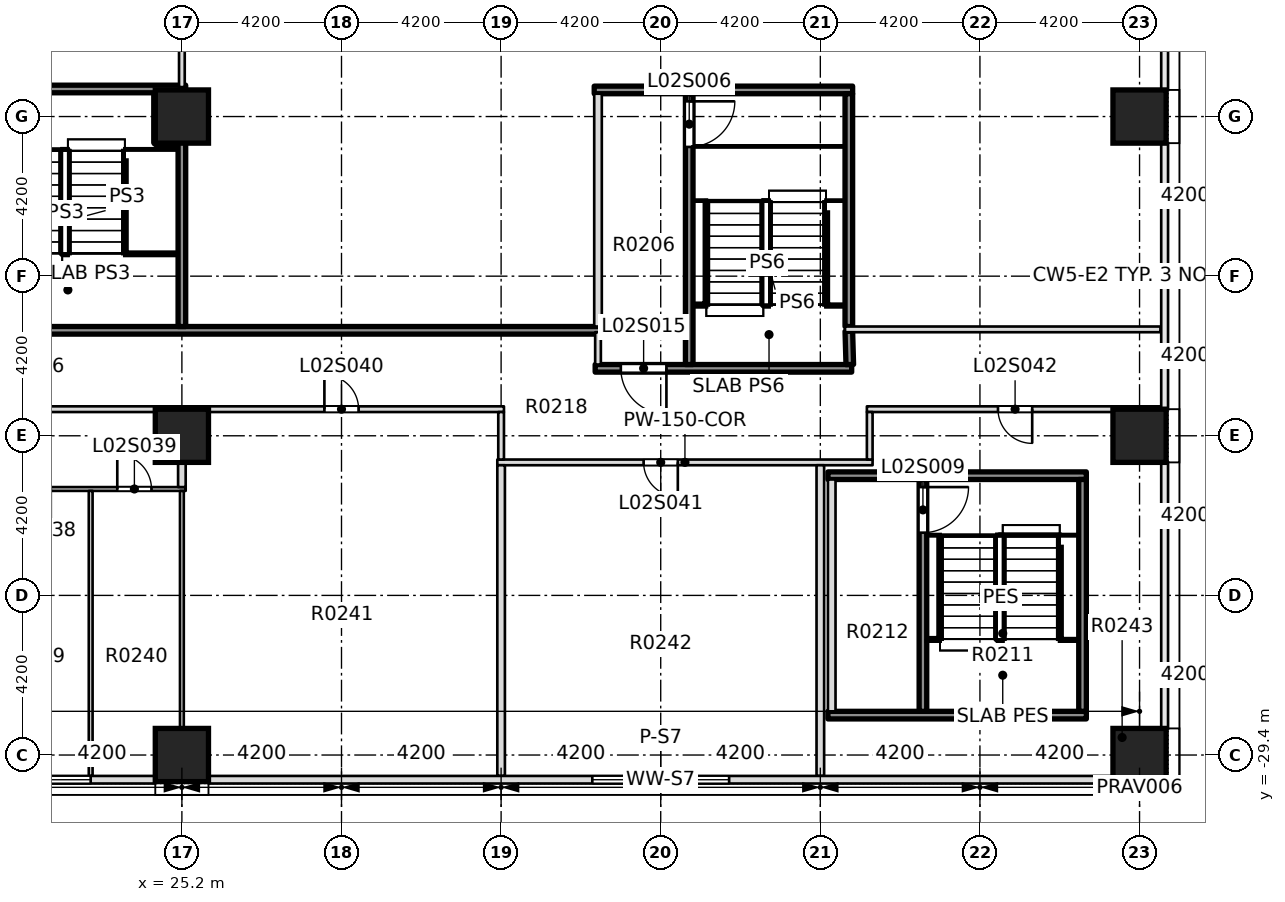
"""IFC4 building model, lengths in metres.
Left out: names, types, materials, properties, quantities, classifications, styles, units other than length and angle.
Written with IfcOpenShell. Run it as: python <this file> out.ifc"""

import sys

from ifc_helpers import new_model, si_unit, direction, frame, frame_2d, origin, origin_2d, place, context, subcontext, project, spatial, rectangle, extrude, element, fill, save


model = new_model("IFC4")
c1 = context("Model", 3, precision=1e-05, world=origin(), true_north=direction((0.0, 1.0)))
c2 = subcontext(c1, "Body", "Model", "MODEL_VIEW")
j1 = project(units=[si_unit("LENGTHUNIT", "METRE"), si_unit("PLANEANGLEUNIT", "RADIAN")], contexts=[c1])
p1 = place(None, origin())
s1 = spatial("IfcSite", under=j1, at=p1, CompositionType="ELEMENT")
p2 = place(p1, origin())
s2 = spatial("IfcBuilding", under=s1, at=p2, CompositionType="ELEMENT")
p3 = place(p2, frame((0.0, 0.0, 12.5)))
s3 = spatial("IfcBuildingStorey", under=s2, at=p3, CompositionType="ELEMENT", Elevation=12.5)
for number, where, z_axis, x_axis in (
    (1, (25.2, -12.6, -0.4), (0.0, 0.0, 1.0), (1.0, 0.0, 0.0)),
    (2, (25.2, -29.4, 0.0), (0.0, 0.0, 1.0), (1.0, 0.0, 0.0)),
    (3, (50.4, -29.4, 0.0), (0.0, 0.0, 1.0), (1.0, 0.0, 0.0)),
    (4, (25.2, -21.0, 0.0), (0.0, 0.0, 1.0), (1.0, 0.0, 0.0)),
    (5, (50.4, -21.0, 0.0), (0.0, 0.0, 1.0), (1.0, 0.0, 0.0)),
    (6, (50.4, -12.6, 0.0), (0.0, 0.0, 1.0), (1.0, 0.0, 0.0)),
):
    element("IfcColumn", number, at=place(p3, frame(where, z_axis=z_axis, x_axis=x_axis)), inside=s3, PredefinedType="COLUMN", context=c2, shape_type="SweptSolid", body=[
        extrude(rectangle(XDim=1.4, YDim=1.4, at=origin_2d()), origin(), (0.0, 0.0, 1.0), 7.5),
    ])
p4 = place(p3, frame((42.2, -28.35, 0.0), z_axis=(0.0, 0.0, 1.0), x_axis=(1.0, 0.0, 0.0)))
e7 = element("IfcWall", 7, at=p4, inside=s3, PredefinedType="SOLIDWALL", context=c2, shape_type="SweptSolid", body=[
    extrude(rectangle(XDim=6.8, YDim=0.2, at=frame_2d((3.4, 0.0))), origin(), (0.0, 0.0, 1.0), 7.1),
])
p5 = place(p3, frame((16.7, -22.4, 0.0), z_axis=(0.0, 0.0, 1.0), x_axis=(1.0, 0.0, 0.0)))
e8 = element("IfcWall", 8, at=p5, inside=s3, PredefinedType="PARTITIONING", context=c2, shape_type="SweptSolid", body=[
    extrude(rectangle(XDim=8.6, YDim=0.1, at=frame_2d((4.3, 0.0))), origin(), (0.0, 0.0, 1.0), 7.1),
])
p6 = place(p5, frame((1.15, 0.0, 0.0)))
e9 = element("IfcOpeningElement", 9, at=p6, cuts=e8, PredefinedType="OPENING", context=c2, shape_type="SweptSolid", body=[
    extrude(rectangle(XDim=0.9, YDim=2.1, at=frame_2d((0.45, 1.05))), frame((0.0, 0.06, 0.0), z_axis=(0.0, -1.0, 0.0), x_axis=(1.0, 0.0, 0.0)), (0.0, 0.0, 1.0), 0.12),
])
p7 = place(p5, frame((4.15, 0.0, 0.0)))
e10 = element("IfcOpeningElement", 10, at=p7, cuts=e8, PredefinedType="OPENING", context=c2, shape_type="SweptSolid", body=[
    extrude(rectangle(XDim=0.9, YDim=2.1, at=frame_2d((0.45, 1.05))), frame((0.0, 0.06, 0.0), z_axis=(0.0, -1.0, 0.0), x_axis=(1.0, 0.0, 0.0)), (0.0, 0.0, 1.0), 0.12),
])
p8 = place(p5, frame((6.8, 0.0, 0.0)))
e11 = element("IfcOpeningElement", 11, at=p8, cuts=e8, PredefinedType="OPENING", context=c2, shape_type="SweptSolid", body=[
    extrude(rectangle(XDim=0.9, YDim=2.1, at=frame_2d((0.45, 1.05))), frame((0.0, 0.06, 0.0), z_axis=(0.0, -1.0, 0.0), x_axis=(1.0, 0.0, 0.0)), (0.0, 0.0, 1.0), 0.12),
])
p9 = place(p3, frame((42.2, -22.05, 0.0), z_axis=(0.0, 0.0, 1.0), x_axis=(1.0, 0.0, 0.0)))
e12 = element("IfcWall", 12, at=p9, inside=s3, PredefinedType="SOLIDWALL", context=c2, shape_type="SweptSolid", body=[
    extrude(rectangle(XDim=6.8, YDim=0.2, at=frame_2d((3.4, 0.0))), origin(), (0.0, 0.0, 1.0), 7.1),
])
p10 = place(p3, frame((33.5, -21.7, 0.0), z_axis=(0.0, 0.0, 1.0), x_axis=(1.0, 0.0, 0.0)))
e13 = element("IfcWall", 13, at=p10, inside=s3, PredefinedType="PARTITIONING", context=c2, shape_type="SweptSolid", body=[
    extrude(rectangle(XDim=9.875, YDim=0.15, at=frame_2d((4.938, 0.0))), origin(), (0.0, 0.0, 1.0), 7.1),
])
p11 = place(p10, frame((3.85, 0.0, 0.0)))
e14 = element("IfcOpeningElement", 14, at=p11, cuts=e13, PredefinedType="OPENING", context=c2, shape_type="SweptSolid", body=[
    extrude(rectangle(XDim=0.9, YDim=2.1, at=frame_2d((0.45, 1.05))), frame((0.0, 0.085, 0.0), z_axis=(0.0, -1.0, 0.0), x_axis=(1.0, 0.0, 0.0)), (0.0, 0.0, 1.0), 0.17),
])
p12 = place(p3, frame((-25.2, -20.3, 0.0), z_axis=(0.0, 0.0, 1.0), x_axis=(1.0, 0.0, 0.0)))
e15 = element("IfcWall", 15, at=p12, inside=s3, PredefinedType="PARTITIONING", context=c2, shape_type="SweptSolid", body=[
    extrude(rectangle(XDim=58.875, YDim=0.15, at=frame_2d((29.438, 0.0))), origin(), (0.0, 0.0, 1.0), 7.1),
])
p13 = place(p12, frame((3.65, 0.0, 0.0)))
e16 = element("IfcOpeningElement", 16, at=p13, cuts=e15, PredefinedType="OPENING", context=c2, shape_type="SweptSolid", body=[
    extrude(rectangle(XDim=1.1, YDim=2.1, at=frame_2d((0.55, 1.05))), frame((0.0, 0.085, 0.0), z_axis=(0.0, -1.0, 0.0), x_axis=(1.0, 0.0, 0.0)), (0.0, 0.0, 1.0), 0.17),
])
p14 = place(p12, frame((11.5, 0.0, 0.0)))
e17 = element("IfcOpeningElement", 17, at=p14, cuts=e15, PredefinedType="OPENING", context=c2, shape_type="SweptSolid", body=[
    extrude(rectangle(XDim=1.2, YDim=2.1, at=frame_2d((0.6, 1.05))), frame((0.0, 0.085, 0.0), z_axis=(0.0, -1.0, 0.0), x_axis=(1.0, 0.0, 0.0)), (0.0, 0.0, 1.0), 0.17),
])
p15 = place(p12, frame((20.55, 0.0, 0.0)))
e18 = element("IfcOpeningElement", 18, at=p15, cuts=e15, PredefinedType="OPENING", context=c2, shape_type="SweptSolid", body=[
    extrude(rectangle(XDim=0.9, YDim=2.1, at=frame_2d((0.45, 1.05))), frame((0.0, 0.085, 0.0), z_axis=(0.0, -1.0, 0.0), x_axis=(1.0, 0.0, 0.0)), (0.0, 0.0, 1.0), 0.17),
])
p16 = place(p12, frame((31.95, 0.0, 0.0)))
e19 = element("IfcOpeningElement", 19, at=p16, cuts=e15, PredefinedType="OPENING", context=c2, shape_type="SweptSolid", body=[
    extrude(rectangle(XDim=0.9, YDim=2.1, at=frame_2d((0.45, 1.05))), frame((0.0, 0.085, 0.0), z_axis=(0.0, -1.0, 0.0), x_axis=(1.0, 0.0, 0.0)), (0.0, 0.0, 1.0), 0.17),
])
p17 = place(p12, frame((45.65, 0.0, 0.0)))
e20 = element("IfcOpeningElement", 20, at=p17, cuts=e15, PredefinedType="OPENING", context=c2, shape_type="SweptSolid", body=[
    extrude(rectangle(XDim=1.1, YDim=2.1, at=frame_2d((0.55, 1.05))), frame((0.0, 0.085, 0.0), z_axis=(0.0, -1.0, 0.0), x_axis=(1.0, 0.0, 0.0)), (0.0, 0.0, 1.0), 0.17),
])
p18 = place(p12, frame((54.15, 0.0, 0.0)))
e21 = element("IfcOpeningElement", 21, at=p18, cuts=e15, PredefinedType="OPENING", context=c2, shape_type="SweptSolid", body=[
    extrude(rectangle(XDim=0.9, YDim=2.1, at=frame_2d((0.45, 1.05))), frame((0.0, 0.085, 0.0), z_axis=(0.0, -1.0, 0.0), x_axis=(1.0, 0.0, 0.0)), (0.0, 0.0, 1.0), 0.17),
])
p19 = place(p3, frame((43.225, -20.3, 0.0), z_axis=(0.0, 0.0, 1.0), x_axis=(1.0, 0.0, 0.0)))
e22 = element("IfcWall", 22, at=p19, inside=s3, PredefinedType="PARTITIONING", context=c2, shape_type="SweptSolid", body=[
    extrude(rectangle(XDim=7.725, YDim=0.15, at=frame_2d((3.862, 0.0))), origin(), (0.0, 0.0, 1.0), 7.1),
])
p20 = place(p19, frame((3.45, 0.0, 0.0)))
e23 = element("IfcOpeningElement", 23, at=p20, cuts=e22, PredefinedType="OPENING", context=c2, shape_type="SweptSolid", body=[
    extrude(rectangle(XDim=0.9, YDim=2.1, at=frame_2d((0.45, 1.05))), frame((0.0, 0.085, 0.0), z_axis=(0.0, -1.0, 0.0), x_axis=(1.0, 0.0, 0.0)), (0.0, 0.0, 1.0), 0.17),
])
p21 = place(p3, frame((36.075, -19.225, 0.0), z_axis=(0.0, 0.0, 1.0), x_axis=(1.0, 0.0, 0.0)))
e24 = element("IfcWall", 24, at=p21, inside=s3, PredefinedType="SOLIDWALL", context=c2, shape_type="SweptSolid", body=[
    extrude(rectangle(XDim=6.75, YDim=0.2, at=frame_2d((3.375, 0.0))), origin(), (0.0, 0.0, 1.0), 7.1),
])
p22 = place(p21, frame((0.675, 0.0, 0.0)))
e25 = element("IfcOpeningElement", 25, at=p22, cuts=e24, PredefinedType="OPENING", context=c2, shape_type="SweptSolid", body=[
    extrude(rectangle(XDim=1.2, YDim=2.1, at=frame_2d((0.6, 1.05))), frame((0.0, 0.11, 0.0), z_axis=(0.0, -1.0, 0.0), x_axis=(1.0, 0.0, 0.0)), (0.0, 0.0, 1.0), 0.22),
])
p23 = place(p3, frame((12.25, -18.225, 0.0), z_axis=(0.0, 0.0, 1.0), x_axis=(1.0, 0.0, 0.0)))
e26 = element("IfcWall", 26, at=p23, inside=s3, PredefinedType="SOLIDWALL", context=c2, shape_type="SweptSolid", body=[
    extrude(rectangle(XDim=24.0, YDim=0.2, at=frame_2d((12.0, 0.0))), origin(), (0.0, 0.0, 1.0), 7.1),
])
p24 = place(p23, frame((5.15, 0.0, 0.0)))
e27 = element("IfcOpeningElement", 27, at=p24, cuts=e26, PredefinedType="OPENING", context=c2, shape_type="SweptSolid", body=[
    extrude(rectangle(XDim=1.2, YDim=2.1, at=frame_2d((0.6, 1.05))), frame((0.0, 0.11, 0.0), z_axis=(0.0, -1.0, 0.0), x_axis=(1.0, 0.0, 0.0)), (0.0, 0.0, 1.0), 0.22),
])
p25 = place(p23, frame((1.825, 0.0, 0.0)))
e28 = element("IfcOpeningElement", 28, at=p25, cuts=e26, PredefinedType="OPENING", context=c2, shape_type="SweptSolid", body=[
    extrude(rectangle(XDim=0.7, YDim=2.1, at=frame_2d((0.35, 1.05))), frame((0.0, 0.11, 0.0), z_axis=(0.0, -1.0, 0.0), x_axis=(1.0, 0.0, 0.0)), (0.0, 0.0, 1.0), 0.22),
])
p26 = place(p3, frame((42.65, -18.2, 0.0), z_axis=(0.0, 0.0, 1.0), x_axis=(1.0, 0.0, 0.0)))
e29 = element("IfcWall", 29, at=p26, inside=s3, PredefinedType="PARTITIONING", context=c2, shape_type="SweptSolid", body=[
    extrude(rectangle(XDim=8.3, YDim=0.15, at=frame_2d((4.15, 0.0))), origin(), (0.0, 0.0, 1.0), 7.1),
])
p27 = place(p3, frame((16.725, -11.875, 0.0), z_axis=(0.0, 0.0, 1.0), x_axis=(1.0, 0.0, 0.0)))
e30 = element("IfcWall", 30, at=p27, inside=s3, PredefinedType="SOLIDWALL", context=c2, shape_type="SweptSolid", body=[
    extrude(rectangle(XDim=8.575, YDim=0.2, at=frame_2d((4.288, 0.0))), origin(), (0.0, 0.0, 1.0), 7.1),
])
p28 = place(p3, frame((36.05, -11.9, 0.0), z_axis=(0.0, 0.0, 1.0), x_axis=(1.0, 0.0, 0.0)))
e31 = element("IfcWall", 31, at=p28, inside=s3, PredefinedType="SOLIDWALL", context=c2, shape_type="SweptSolid", body=[
    extrude(rectangle(XDim=6.8, YDim=0.2, at=frame_2d((3.4, 0.0))), origin(), (0.0, 0.0, 1.0), 7.1),
])
for number, where, z_axis, x_axis in (
    (32, (22.8, -29.95, 0.0), (0.0, 0.0, 1.0), (0.0, 1.0, 0.0)),
    (33, (25.2, -29.95, 0.0), (0.0, 0.0, 1.0), (0.0, 1.0, 0.0)),
):
    element("IfcWall", number, at=place(p3, frame(where, z_axis=z_axis, x_axis=x_axis)), inside=s3, PredefinedType="PARTITIONING", context=c2, shape_type="SweptSolid", body=[
        extrude(rectangle(XDim=7.5, YDim=0.1, at=frame_2d((3.75, 0.0))), origin(), (0.0, 0.0, 1.0), 7.1),
    ])
p29 = place(p3, frame((25.2, -22.35, 0.0), z_axis=(0.0, 0.0, 1.0), x_axis=(0.0, 1.0, 0.0)))
e34 = element("IfcWall", 34, at=p29, inside=s3, PredefinedType="PARTITIONING", context=c2, shape_type="SweptSolid", body=[
    extrude(rectangle(XDim=1.975, YDim=0.2, at=frame_2d((0.988, 0.0))), origin(), (0.0, 0.0, 1.0), 7.1),
])
p30 = place(p3, frame((25.2, -18.125, 0.0), z_axis=(0.0, 0.0, 1.0), x_axis=(0.0, 1.0, 0.0)))
e35 = element("IfcWall", 35, at=p30, inside=s3, PredefinedType="SOLIDWALL", context=c2, shape_type="SweptSolid", body=[
    extrude(rectangle(XDim=6.15, YDim=0.2, at=frame_2d((3.075, 0.0))), origin(), (0.0, 0.0, 1.0), 7.1),
])
p31 = place(p3, frame((25.2, -11.825, 0.0), z_axis=(0.0, 0.0, 1.0), x_axis=(0.0, 1.0, 0.0)))
e36 = element("IfcWall", 36, at=p31, inside=s3, PredefinedType="PARTITIONING", context=c2, shape_type="SweptSolid", body=[
    extrude(rectangle(XDim=24.325, YDim=0.15, at=frame_2d((12.163, 0.0))), origin(), (0.0, 0.0, 1.0), 7.1),
])
p32 = place(p31, frame((10.962, 0.0, 0.0)))
e37 = element("IfcOpeningElement", 37, at=p32, cuts=e36, PredefinedType="OPENING", context=c2, shape_type="SweptSolid", body=[
    extrude(rectangle(XDim=2.4, YDim=2.1, at=frame_2d((1.2, 1.05))), frame((0.0, 0.085, 0.0), z_axis=(0.0, -1.0, 0.0), x_axis=(1.0, 0.0, 0.0)), (0.0, 0.0, 1.0), 0.17),
])
p33 = place(p3, frame((33.6, -29.95, 0.0), z_axis=(0.0, 0.0, 1.0), x_axis=(0.0, 1.0, 0.0)))
e38 = element("IfcWall", 38, at=p33, inside=s3, PredefinedType="PARTITIONING", context=c2, shape_type="SweptSolid", body=[
    extrude(rectangle(XDim=8.175, YDim=0.2, at=frame_2d((4.087, 0.0))), origin(), (0.0, 0.0, 1.0), 7.1),
])
p34 = place(p3, frame((33.6, -21.625, 0.0), z_axis=(0.0, 0.0, 1.0), x_axis=(0.0, 1.0, 0.0)))
e39 = element("IfcWall", 39, at=p34, inside=s3, PredefinedType="PARTITIONING", context=c2, shape_type="SweptSolid", body=[
    extrude(rectangle(XDim=1.25, YDim=0.15, at=frame_2d((0.625, 0.0))), origin(), (0.0, 0.0, 1.0), 7.1),
])
p35 = place(p3, frame((36.15, -19.125, 0.0), z_axis=(0.0, 0.0, 1.0), x_axis=(0.0, 1.0, 0.0)))
e40 = element("IfcWall", 40, at=p35, inside=s3, PredefinedType="PARTITIONING", context=c2, shape_type="SweptSolid", body=[
    extrude(rectangle(XDim=0.85, YDim=0.15, at=frame_2d((0.425, 0.0))), origin(), (0.0, 0.0, 1.0), 7.1),
])
p36 = place(p3, frame((36.15, -18.125, 0.0), z_axis=(0.0, 0.0, 1.0), x_axis=(0.0, 1.0, 0.0)))
e41 = element("IfcWall", 41, at=p36, inside=s3, PredefinedType="PARTITIONING", context=c2, shape_type="SweptSolid", body=[
    extrude(rectangle(XDim=6.125, YDim=0.2, at=frame_2d((3.062, 0.0))), origin(), (0.0, 0.0, 1.0), 7.1),
])
p37 = place(p3, frame((38.55, -19.125, 0.0), z_axis=(0.0, 0.0, 1.0), x_axis=(0.0, 1.0, 0.0)))
e42 = element("IfcWall", 42, at=p37, inside=s3, PredefinedType="SOLIDWALL", context=c2, shape_type="SweptSolid", body=[
    extrude(rectangle(XDim=7.125, YDim=0.2, at=frame_2d((3.562, 0.0))), origin(), (0.0, 0.0, 1.0), 7.1),
])
p38 = place(p37, frame((5.725, 0.0, 0.0)))
e43 = element("IfcOpeningElement", 43, at=p38, cuts=e42, PredefinedType="OPENING", context=c2, shape_type="SweptSolid", body=[
    extrude(rectangle(XDim=1.2, YDim=2.1, at=frame_2d((0.6, 1.05))), frame((0.0, 0.11, 0.0), z_axis=(0.0, -1.0, 0.0), x_axis=(1.0, 0.0, 0.0)), (0.0, 0.0, 1.0), 0.22),
])
p39 = place(p3, frame((42.0, -29.95, 0.0), z_axis=(0.0, 0.0, 1.0), x_axis=(0.0, 1.0, 0.0)))
e44 = element("IfcWall", 44, at=p39, inside=s3, PredefinedType="PARTITIONING", context=c2, shape_type="SweptSolid", body=[
    extrude(rectangle(XDim=8.175, YDim=0.2, at=frame_2d((4.087, 0.0))), origin(), (0.0, 0.0, 1.0), 7.1),
])
p40 = place(p3, frame((42.3, -28.25, 0.0), z_axis=(0.0, 0.0, 1.0), x_axis=(0.0, 1.0, 0.0)))
e45 = element("IfcWall", 45, at=p40, inside=s3, PredefinedType="PARTITIONING", context=c2, shape_type="SweptSolid", body=[
    extrude(rectangle(XDim=6.1, YDim=0.2, at=frame_2d((3.05, 0.0))), origin(), (0.0, 0.0, 1.0), 7.1),
])
p41 = place(p3, frame((42.775, -19.125, 0.0), z_axis=(0.0, 0.0, 1.0), x_axis=(-0.028448302746, 0.99959526513, 0.0)))
e46 = element("IfcWall", 46, at=p41, inside=s3, PredefinedType="SOLIDWALL", context=c2, shape_type="SweptSolid", body=[
    extrude(rectangle(XDim=0.875, YDim=0.2, at=frame_2d((0.438, 0.0))), origin(), (0.0, 0.0, 1.0), 7.1),
])
p42 = place(p3, frame((43.3, -21.625, 0.0), z_axis=(0.0, 0.0, 1.0), x_axis=(0.0, 1.0, 0.0)))
e47 = element("IfcWall", 47, at=p42, inside=s3, PredefinedType="PARTITIONING", context=c2, shape_type="SweptSolid", body=[
    extrude(rectangle(XDim=1.25, YDim=0.15, at=frame_2d((0.625, 0.0))), origin(), (0.0, 0.0, 1.0), 7.1),
])
p43 = place(p3, frame((44.7, -28.25, 0.0), z_axis=(0.0, 0.0, 1.0), x_axis=(0.0, 1.0, 0.0)))
e48 = element("IfcWall", 48, at=p43, inside=s3, PredefinedType="SOLIDWALL", context=c2, shape_type="SweptSolid", body=[
    extrude(rectangle(XDim=6.1, YDim=0.2, at=frame_2d((3.05, 0.0))), origin(), (0.0, 0.0, 1.0), 7.1),
])
p44 = place(p43, frame((4.7, 0.0, 0.0)))
e49 = element("IfcOpeningElement", 49, at=p44, cuts=e48, PredefinedType="OPENING", context=c2, shape_type="SweptSolid", body=[
    extrude(rectangle(XDim=1.2, YDim=2.1, at=frame_2d((0.6, 1.05))), frame((0.0, 0.11, 0.0), z_axis=(0.0, -1.0, 0.0), x_axis=(1.0, 0.0, 0.0)), (0.0, 0.0, 1.0), 0.22),
])
p45 = place(p3, frame((48.9, -28.25, 0.0), z_axis=(0.0, 0.0, 1.0), x_axis=(0.0, 1.0, 0.0)))
e50 = element("IfcWall", 50, at=p45, inside=s3, PredefinedType="SOLIDWALL", context=c2, shape_type="SweptSolid", body=[
    extrude(rectangle(XDim=6.1, YDim=0.2, at=frame_2d((3.05, 0.0))), origin(), (0.0, 0.0, 1.0), 7.1),
])
p46 = place(p3, frame((17.5, -30.05, 0.0), z_axis=(0.0, 0.0, 1.0), x_axis=(1.0, 0.0, 0.0)))
e51 = element("IfcWall", 51, at=p46, inside=s3, PredefinedType="STANDARD", context=c2, shape_type="SweptSolid", body=[
    extrude(rectangle(XDim=7.0, YDim=0.2, at=frame_2d((3.5, 0.0))), origin(), (0.0, 0.0, 1.0), 7.1),
])
p47 = place(p46, frame((1.7, 0.0, 0.9)))
e52 = element("IfcOpeningElement", 52, at=p47, cuts=e51, PredefinedType="OPENING", context=c2, shape_type="SweptSolid", body=[
    extrude(rectangle(XDim=3.6, YDim=4.2, at=frame_2d((1.8, 2.1))), frame((0.0, 0.11, 0.0), z_axis=(0.0, -1.0, 0.0), x_axis=(1.0, 0.0, 0.0)), (0.0, 0.0, 1.0), 0.22),
])
p48 = place(p3, frame((25.9, -30.05, 0.0), z_axis=(0.0, 0.0, 1.0), x_axis=(1.0, 0.0, 0.0)))
e53 = element("IfcWall", 53, at=p48, inside=s3, PredefinedType="STANDARD", context=c2, shape_type="SweptSolid", body=[
    extrude(rectangle(XDim=23.8, YDim=0.2, at=frame_2d((11.9, 0.0))), origin(), (0.0, 0.0, 1.0), 7.1),
])
p49 = place(p48, frame((10.1, 0.0, 0.9)))
e54 = element("IfcOpeningElement", 54, at=p49, cuts=e53, PredefinedType="OPENING", context=c2, shape_type="SweptSolid", body=[
    extrude(rectangle(XDim=3.6, YDim=4.2, at=frame_2d((1.8, 2.1))), frame((0.0, 0.11, 0.0), z_axis=(0.0, -1.0, 0.0), x_axis=(1.0, 0.0, 0.0)), (0.0, 0.0, 1.0), 0.22),
])
p50 = place(p3, frame((42.75, -18.125, 0.0), z_axis=(0.0, 0.0, 1.0), x_axis=(0.0, 1.0, 0.0)))
e55 = element("IfcWall", 55, at=p50, inside=s3, PredefinedType="SOLIDWALL", context=c2, shape_type="SweptSolid", body=[
    extrude(rectangle(XDim=6.125, YDim=0.2, at=frame_2d((3.062, 0.0))), origin(), (0.0, 0.0, 1.0), 7.1),
])
p51 = place(p38, origin())
e56 = element("IfcDoor", 56, at=p51, inside=s3, OperationType="DOUBLE_DOOR_SINGLE_SWING", PredefinedType="DOOR", context=c2, shape_type="SweptSolid", body=[
    extrude(rectangle(XDim=1.2, YDim=2.1, at=frame_2d((0.6, 1.05))), frame((0.0, 0.025, 0.0), z_axis=(0.0, -1.0, 0.0), x_axis=(1.0, 0.0, 0.0)), (0.0, 0.0, 1.0), 0.05),
])
fill(e43, e56)
p52 = place(p44, origin())
e57 = element("IfcDoor", 57, at=p52, inside=s3, OperationType="DOUBLE_DOOR_SINGLE_SWING", PredefinedType="DOOR", context=c2, shape_type="SweptSolid", body=[
    extrude(rectangle(XDim=1.2, YDim=2.1, at=frame_2d((0.6, 1.05))), frame((0.0, 0.025, 0.0), z_axis=(0.0, -1.0, 0.0), x_axis=(1.0, 0.0, 0.0)), (0.0, 0.0, 1.0), 0.05),
])
fill(e49, e57)
p53 = place(p22, origin())
e58 = element("IfcDoor", 58, at=p53, inside=s3, OperationType="SINGLE_SWING_LEFT", PredefinedType="DOOR", context=c2, shape_type="SweptSolid", body=[
    extrude(rectangle(XDim=1.2, YDim=2.1, at=frame_2d((0.6, 1.05))), frame((0.0, 0.025, 0.0), z_axis=(0.0, -1.0, 0.0), x_axis=(1.0, 0.0, 0.0)), (0.0, 0.0, 1.0), 0.05),
])
fill(e25, e58)
p54 = place(p8, origin())
e59 = element("IfcDoor", 59, at=p54, inside=s3, OperationType="SINGLE_SWING_RIGHT", PredefinedType="DOOR", context=c2, shape_type="SweptSolid", body=[
    extrude(rectangle(XDim=0.9, YDim=2.1, at=frame_2d((0.45, 1.05))), frame((0.0, 0.025, 0.0), z_axis=(0.0, -1.0, 0.0), x_axis=(1.0, 0.0, 0.0)), (0.0, 0.0, 1.0), 0.05),
])
fill(e11, e59)
p55 = place(p18, origin())
e60 = element("IfcDoor", 60, at=p55, inside=s3, OperationType="SINGLE_SWING_RIGHT", PredefinedType="DOOR", context=c2, shape_type="SweptSolid", body=[
    extrude(rectangle(XDim=0.9, YDim=2.1, at=frame_2d((0.45, 1.05))), frame((0.0, 0.025, 0.0), z_axis=(0.0, -1.0, 0.0), x_axis=(1.0, 0.0, 0.0)), (0.0, 0.0, 1.0), 0.05),
])
fill(e21, e60)
p56 = place(p11, origin())
e61 = element("IfcDoor", 61, at=p56, inside=s3, OperationType="SINGLE_SWING_RIGHT", PredefinedType="DOOR", context=c2, shape_type="SweptSolid", body=[
    extrude(rectangle(XDim=0.9, YDim=2.1, at=frame_2d((0.45, 1.05))), frame((0.0, 0.025, 0.0), z_axis=(0.0, -1.0, 0.0), x_axis=(1.0, 0.0, 0.0)), (0.0, 0.0, 1.0), 0.05),
])
fill(e14, e61)
p57 = place(p20, origin())
e62 = element("IfcDoor", 62, at=p57, inside=s3, OperationType="SINGLE_SWING_RIGHT", PredefinedType="DOOR", context=c2, shape_type="SweptSolid", body=[
    extrude(rectangle(XDim=0.9, YDim=2.1, at=frame_2d((0.45, 1.05))), frame((0.0, 0.025, 0.0), z_axis=(0.0, -1.0, 0.0), x_axis=(1.0, 0.0, 0.0)), (0.0, 0.0, 1.0), 0.05),
])
fill(e23, e62)
p58 = place(p47, origin())
e63 = element("IfcWindow", 63, at=p58, inside=s3, PartitioningType="SINGLE_PANEL", PredefinedType="WINDOW", context=c2, shape_type="SweptSolid", body=[
    extrude(rectangle(XDim=3.6, YDim=4.2, at=frame_2d((1.8, 2.1))), frame((0.0, 0.03, 0.0), z_axis=(0.0, -1.0, 0.0), x_axis=(1.0, 0.0, 0.0)), (0.0, 0.0, 1.0), 0.06),
])
fill(e52, e63)
p59 = place(p49, origin())
e64 = element("IfcWindow", 64, at=p59, inside=s3, PartitioningType="SINGLE_PANEL", PredefinedType="WINDOW", context=c2, shape_type="SweptSolid", body=[
    extrude(rectangle(XDim=3.6, YDim=4.2, at=frame_2d((1.8, 2.1))), frame((0.0, 0.03, 0.0), z_axis=(0.0, -1.0, 0.0), x_axis=(1.0, 0.0, 0.0)), (0.0, 0.0, 1.0), 0.06),
])
fill(e54, e64)
save(model, sys.argv[1])
